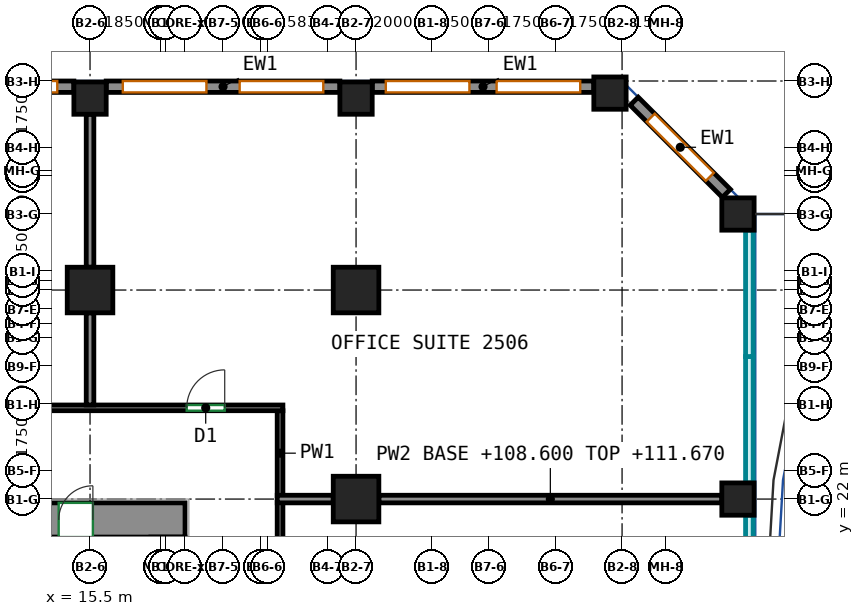
"""IFC4 building model, lengths in metres.
Left out: names, types, materials, properties, quantities, classifications, styles, units other than length and angle.
Written with IfcOpenShell. Run it as: python <this file> out.ifc"""

import sys

from ifc_helpers import new_model, si_unit, direction, frame, frame_2d, origin, origin_2d, place, context, subcontext, project, spatial, rectangle, extrude, source, transform, mapped, element, fill, save


model = new_model("IFC4")
c1 = context("Model", 3, precision=1e-05, world=origin(), true_north=direction((0.0, 1.0)))
c2 = subcontext(c1, "Body", "Model", "MODEL_VIEW")
j1 = project(units=[si_unit("LENGTHUNIT", "METRE"), si_unit("PLANEANGLEUNIT", "RADIAN")], contexts=[c1])
p1 = place(None, origin())
s1 = spatial("IfcSite", under=j1, at=p1, CompositionType="ELEMENT")
p2 = place(p1, origin())
s2 = spatial("IfcBuilding", under=s1, at=p2, CompositionType="ELEMENT")
p3 = place(p2, frame((0.0, 0.0, 108.6)))
s3 = spatial("IfcBuildingStorey", under=s2, at=p3, CompositionType="ELEMENT", Elevation=108.6)
m1 = source(origin(), c2, "Body", "SweptSolid", [
    extrude(rectangle(XDim=1.2, YDim=1.2, at=origin_2d()), origin(), (0.0, 0.0, 1.0), 3.72),
])
p4 = place(p3, frame((15.5, 27.5, 0.0), z_axis=(0.0, 0.0, 1.0), x_axis=(1.0, 0.0, 0.0)))
e1 = element("IfcColumn", 1, at=p4, inside=s3, PredefinedType="COLUMN", context=c2, shape_type="MappedRepresentation", body=[
    mapped(m1, transform((0.0, 0.0, 0.0))),
])
m2 = source(origin(), c2, "Body", "SweptSolid", [
    extrude(rectangle(XDim=0.85, YDim=0.85, at=origin_2d()), origin(), (0.0, 0.0, 1.0), 3.72),
])
p5 = place(p3, frame((15.5, 32.55, 0.0), z_axis=(0.0, 0.0, 1.0), x_axis=(1.0, 0.0, 0.0)))
e2 = element("IfcColumn", 2, at=p5, inside=s3, PredefinedType="COLUMN", context=c2, shape_type="MappedRepresentation", body=[
    mapped(m2, transform((0.0, 0.0, 0.0))),
])
for number, where, z_axis, x_axis in (
    (3, (22.5, 22.0, 0.0), (0.0, 0.0, 1.0), (1.0, 0.0, 0.0)),
    (4, (22.5, 27.5, 0.0), (0.0, 0.0, 1.0), (1.0, 0.0, 0.0)),
):
    element("IfcColumn", number, at=place(p3, frame(where, z_axis=z_axis, x_axis=x_axis)), inside=s3, PredefinedType="COLUMN", context=c2, shape_type="MappedRepresentation", body=[
        mapped(m1, transform((0.0, 0.0, 0.0))),
    ])
for number, where, z_axis, x_axis in (
    (5, (22.5, 32.55, 0.0), (0.0, 0.0, 1.0), (1.0, 0.0, 0.0)),
    (6, (29.182, 32.682, 0.0), (0.0, 0.0, 1.0), (1.0, 0.0, 0.0)),
    (7, (32.55, 22.0, 0.0), (0.0, 0.0, 1.0), (1.0, 0.0, 0.0)),
    (8, (32.55, 29.5, 0.0), (0.0, 0.0, 1.0), (1.0, 0.0, 0.0)),
):
    element("IfcColumn", number, at=place(p3, frame(where, z_axis=z_axis, x_axis=x_axis)), inside=s3, PredefinedType="COLUMN", context=c2, shape_type="MappedRepresentation", body=[
        mapped(m2, transform((0.0, 0.0, 0.0))),
    ])
m3 = source(origin(), c2, "Body", "SweptSolid", [
    extrude(rectangle(XDim=33.9, YDim=0.9, at=frame_2d((16.95, 0.0))), origin(), (0.0, 0.0, 1.0), 3.72),
])
p6 = place(p3, frame((-15.9, 21.45, 0.0), z_axis=(0.0, 0.0, 1.0), x_axis=(1.0, 0.0, 0.0)))
e9 = element("IfcWall", 9, at=p6, inside=s3, PredefinedType="SHEAR", context=c2, shape_type="MappedRepresentation", body=[
    mapped(m3, transform((0.0, 0.0, 0.0))),
])
p7 = place(p6, frame((7.12, 0.0, 0.0)))
e10 = element("IfcOpeningElement", 10, at=p7, cuts=e9, PredefinedType="OPENING", context=c2, shape_type="SweptSolid", body=[
    extrude(rectangle(XDim=0.9, YDim=2.1, at=frame_2d((0.45, 1.05))), frame((0.0, 0.46, 0.0), z_axis=(0.0, -1.0, 0.0), x_axis=(1.0, 0.0, 0.0)), (0.0, 0.0, 1.0), 0.92),
])
p8 = place(p6, frame((12.427, 0.0, 0.0)))
e11 = element("IfcOpeningElement", 11, at=p8, cuts=e9, PredefinedType="OPENING", context=c2, shape_type="SweptSolid", body=[
    extrude(rectangle(XDim=0.9, YDim=2.1, at=frame_2d((0.45, 1.05))), frame((0.0, 0.46, 0.0), z_axis=(0.0, -1.0, 0.0), x_axis=(1.0, 0.0, 0.0)), (0.0, 0.0, 1.0), 0.92),
])
p9 = place(p6, frame((17.465, 0.0, 0.0)))
e12 = element("IfcOpeningElement", 12, at=p9, cuts=e9, PredefinedType="OPENING", context=c2, shape_type="SweptSolid", body=[
    extrude(rectangle(XDim=0.9, YDim=2.1, at=frame_2d((0.45, 1.05))), frame((0.0, 0.46, 0.0), z_axis=(0.0, -1.0, 0.0), x_axis=(1.0, 0.0, 0.0)), (0.0, 0.0, 1.0), 0.92),
])
p10 = place(p6, frame((21.686, 0.0, 0.0)))
e13 = element("IfcOpeningElement", 13, at=p10, cuts=e9, PredefinedType="OPENING", context=c2, shape_type="SweptSolid", body=[
    extrude(rectangle(XDim=0.9, YDim=2.1, at=frame_2d((0.45, 1.05))), frame((0.0, 0.46, 0.0), z_axis=(0.0, -1.0, 0.0), x_axis=(1.0, 0.0, 0.0)), (0.0, 0.0, 1.0), 0.92),
])
p11 = place(p6, frame((26.027, 0.0, 0.0)))
e14 = element("IfcOpeningElement", 14, at=p11, cuts=e9, PredefinedType="OPENING", context=c2, shape_type="SweptSolid", body=[
    extrude(rectangle(XDim=0.9, YDim=2.1, at=frame_2d((0.45, 1.05))), frame((0.0, 0.46, 0.0), z_axis=(0.0, -1.0, 0.0), x_axis=(1.0, 0.0, 0.0)), (0.0, 0.0, 1.0), 0.92),
])
p12 = place(p6, frame((2.425, 0.0, 0.0)))
e15 = element("IfcOpeningElement", 15, at=p12, cuts=e9, PredefinedType="OPENING", context=c2, shape_type="SweptSolid", body=[
    extrude(rectangle(XDim=0.9, YDim=2.1, at=frame_2d((0.45, 1.05))), frame((0.0, 0.46, 0.0), z_axis=(0.0, -1.0, 0.0), x_axis=(1.0, 0.0, 0.0)), (0.0, 0.0, 1.0), 0.92),
])
p13 = place(p6, frame((30.575, 0.0, 0.0)))
e16 = element("IfcOpeningElement", 16, at=p13, cuts=e9, PredefinedType="OPENING", context=c2, shape_type="SweptSolid", body=[
    extrude(rectangle(XDim=0.9, YDim=2.1, at=frame_2d((0.45, 1.05))), frame((0.0, 0.46, 0.0), z_axis=(0.0, -1.0, 0.0), x_axis=(1.0, 0.0, 0.0)), (0.0, 0.0, 1.0), 0.92),
])
m4 = source(origin(), c2, "Body", "SweptSolid", [
    extrude(rectangle(XDim=3.429, YDim=0.3, at=frame_2d((1.715, 0.0))), origin(), (0.0, 0.0, 1.0), 3.72),
])
p14 = place(p3, frame((32.244, 30.044, 0.0), z_axis=(0.0, 0.0, 1.0), x_axis=(-0.707106781187, 0.707106781187, 0.0)))
e17 = element("IfcWall", 17, at=p14, inside=s3, PredefinedType="SOLIDWALL", context=c2, shape_type="MappedRepresentation", body=[
    mapped(m4, transform((0.0, 0.0, 0.0))),
])
p15 = place(p14, frame((0.615, 0.0, 0.7)))
e18 = element("IfcOpeningElement", 18, at=p15, cuts=e17, PredefinedType="OPENING", context=c2, shape_type="SweptSolid", body=[
    extrude(rectangle(XDim=2.2, YDim=2.25, at=frame_2d((1.1, 1.125))), frame((0.0, 0.16, 0.0), z_axis=(0.0, -1.0, 0.0), x_axis=(1.0, 0.0, 0.0)), (0.0, 0.0, 1.0), 0.32),
])
m5 = source(origin(), c2, "Body", "SweptSolid", [
    extrude(rectangle(XDim=5.832, YDim=0.3, at=frame_2d((2.916, 0.0))), origin(), (0.0, 0.0, 1.0), 3.72),
])
p16 = place(p3, frame((28.757, 32.85, 0.0), z_axis=(0.0, 0.0, 1.0), x_axis=(-1.0, 0.0, 0.0)))
e19 = element("IfcWall", 19, at=p16, inside=s3, PredefinedType="SOLIDWALL", context=c2, shape_type="MappedRepresentation", body=[
    mapped(m5, transform((0.0, 0.0, 0.0))),
])
p17 = place(p16, frame((0.358, 0.0, 0.7)))
e20 = element("IfcOpeningElement", 20, at=p17, cuts=e19, PredefinedType="OPENING", context=c2, shape_type="SweptSolid", body=[
    extrude(rectangle(XDim=2.2, YDim=2.25, at=frame_2d((1.1, 1.125))), frame((0.0, 0.16, 0.0), z_axis=(0.0, -1.0, 0.0), x_axis=(1.0, 0.0, 0.0)), (0.0, 0.0, 1.0), 0.32),
])
p18 = place(p16, frame((3.274, 0.0, 0.7)))
e21 = element("IfcOpeningElement", 21, at=p18, cuts=e19, PredefinedType="OPENING", context=c2, shape_type="SweptSolid", body=[
    extrude(rectangle(XDim=2.2, YDim=2.25, at=frame_2d((1.1, 1.125))), frame((0.0, 0.16, 0.0), z_axis=(0.0, -1.0, 0.0), x_axis=(1.0, 0.0, 0.0)), (0.0, 0.0, 1.0), 0.32),
])
m6 = source(origin(), c2, "Body", "SweptSolid", [
    extrude(rectangle(XDim=6.15, YDim=0.3, at=frame_2d((3.075, 0.0))), origin(), (0.0, 0.0, 1.0), 3.72),
])
p19 = place(p3, frame((22.075, 32.85, 0.0), z_axis=(0.0, 0.0, 1.0), x_axis=(-1.0, 0.0, 0.0)))
e22 = element("IfcWall", 22, at=p19, inside=s3, PredefinedType="SOLIDWALL", context=c2, shape_type="MappedRepresentation", body=[
    mapped(m6, transform((0.0, 0.0, 0.0))),
])
p20 = place(p19, frame((0.438, 0.0, 0.7)))
e23 = element("IfcOpeningElement", 23, at=p20, cuts=e22, PredefinedType="OPENING", context=c2, shape_type="SweptSolid", body=[
    extrude(rectangle(XDim=2.2, YDim=2.25, at=frame_2d((1.1, 1.125))), frame((0.0, 0.16, 0.0), z_axis=(0.0, -1.0, 0.0), x_axis=(1.0, 0.0, 0.0)), (0.0, 0.0, 1.0), 0.32),
])
p21 = place(p19, frame((3.512, 0.0, 0.7)))
e24 = element("IfcOpeningElement", 24, at=p21, cuts=e22, PredefinedType="OPENING", context=c2, shape_type="SweptSolid", body=[
    extrude(rectangle(XDim=2.2, YDim=2.25, at=frame_2d((1.1, 1.125))), frame((0.0, 0.16, 0.0), z_axis=(0.0, -1.0, 0.0), x_axis=(1.0, 0.0, 0.0)), (0.0, 0.0, 1.0), 0.32),
])
p22 = place(p3, frame((15.075, 32.85, 0.0), z_axis=(0.0, 0.0, 1.0), x_axis=(-1.0, 0.0, 0.0)))
e25 = element("IfcWall", 25, at=p22, inside=s3, PredefinedType="SOLIDWALL", context=c2, shape_type="MappedRepresentation", body=[
    mapped(m6, transform((0.0, 0.0, 0.0))),
])
p23 = place(p22, frame((0.438, 0.0, 0.7)))
e26 = element("IfcOpeningElement", 26, at=p23, cuts=e25, PredefinedType="OPENING", context=c2, shape_type="SweptSolid", body=[
    extrude(rectangle(XDim=2.2, YDim=2.25, at=frame_2d((1.1, 1.125))), frame((0.0, 0.16, 0.0), z_axis=(0.0, -1.0, 0.0), x_axis=(1.0, 0.0, 0.0)), (0.0, 0.0, 1.0), 0.32),
])
p24 = place(p22, frame((3.512, 0.0, 0.7)))
e27 = element("IfcOpeningElement", 27, at=p24, cuts=e25, PredefinedType="OPENING", context=c2, shape_type="SweptSolid", body=[
    extrude(rectangle(XDim=2.2, YDim=2.25, at=frame_2d((1.1, 1.125))), frame((0.0, 0.16, 0.0), z_axis=(0.0, -1.0, 0.0), x_axis=(1.0, 0.0, 0.0)), (0.0, 0.0, 1.0), 0.32),
])
p25 = place(p3, frame((20.5, 17.75, 0.0), z_axis=(0.0, 0.0, 1.0), x_axis=(0.0, 1.0, 0.0)))
e28 = element("IfcWall", 28, at=p25, inside=s3, PredefinedType="PARTITIONING", context=c2, shape_type="SweptSolid", body=[
    extrude(rectangle(XDim=4.16, YDim=0.15, at=frame_2d((2.08, 0.0))), origin(), (0.0, 0.0, 1.0), 3.72),
])
p26 = place(p25, frame((1.324, 0.0, 0.0)))
e29 = element("IfcOpeningElement", 29, at=p26, cuts=e28, PredefinedType="OPENING", context=c2, shape_type="SweptSolid", body=[
    extrude(rectangle(XDim=0.9, YDim=2.1, at=frame_2d((0.45, 1.05))), frame((0.0, 0.085, 0.0), z_axis=(0.0, -1.0, 0.0), x_axis=(1.0, 0.0, 0.0)), (0.0, 0.0, 1.0), 0.17),
])
p27 = place(p3, frame((20.5, 22.09, 0.0), z_axis=(0.0, 0.0, 1.0), x_axis=(0.0, 1.0, 0.0)))
e30 = element("IfcWall", 30, at=p27, inside=s3, PredefinedType="PARTITIONING", context=c2, shape_type="SweptSolid", body=[
    extrude(rectangle(XDim=2.235, YDim=0.15, at=frame_2d((1.117, 0.0))), origin(), (0.0, 0.0, 1.0), 3.72),
])
p28 = place(p3, frame((-19.575, 24.4, 0.0), z_axis=(0.0, 0.0, 1.0), x_axis=(1.0, 0.0, 0.0)))
e31 = element("IfcWall", 31, at=p28, inside=s3, PredefinedType="PARTITIONING", context=c2, shape_type="SweptSolid", body=[
    extrude(rectangle(XDim=40.15, YDim=0.15, at=frame_2d((20.075, 0.0))), origin(), (0.0, 0.0, 1.0), 3.72),
])
p29 = place(p28, frame((9.974, 0.0, 0.0)))
e32 = element("IfcOpeningElement", 32, at=p29, cuts=e31, PredefinedType="OPENING", context=c2, shape_type="SweptSolid", body=[
    extrude(rectangle(XDim=0.9, YDim=2.1, at=frame_2d((0.45, 1.05))), frame((0.0, 0.085, 0.0), z_axis=(0.0, -1.0, 0.0), x_axis=(1.0, 0.0, 0.0)), (0.0, 0.0, 1.0), 0.17),
])
p30 = place(p28, frame((15.57, 0.0, 0.0)))
e33 = element("IfcOpeningElement", 33, at=p30, cuts=e31, PredefinedType="OPENING", context=c2, shape_type="SweptSolid", body=[
    extrude(rectangle(XDim=0.9, YDim=2.1, at=frame_2d((0.45, 1.05))), frame((0.0, 0.085, 0.0), z_axis=(0.0, -1.0, 0.0), x_axis=(1.0, 0.0, 0.0)), (0.0, 0.0, 1.0), 0.17),
])
p31 = place(p28, frame((26.373, 0.0, 0.0)))
e34 = element("IfcOpeningElement", 34, at=p31, cuts=e31, PredefinedType="OPENING", context=c2, shape_type="SweptSolid", body=[
    extrude(rectangle(XDim=1.0, YDim=2.1, at=frame_2d((0.5, 1.05))), frame((0.0, 0.085, 0.0), z_axis=(0.0, -1.0, 0.0), x_axis=(1.0, 0.0, 0.0)), (0.0, 0.0, 1.0), 0.17),
])
p32 = place(p28, frame((37.619, 0.0, 0.0)))
e35 = element("IfcOpeningElement", 35, at=p32, cuts=e31, PredefinedType="OPENING", context=c2, shape_type="SweptSolid", body=[
    extrude(rectangle(XDim=1.0, YDim=2.1, at=frame_2d((0.5, 1.05))), frame((0.0, 0.085, 0.0), z_axis=(0.0, -1.0, 0.0), x_axis=(1.0, 0.0, 0.0)), (0.0, 0.0, 1.0), 0.17),
])
p33 = place(p3, frame((23.1, 22.0, 0.0), z_axis=(0.0, 0.0, 1.0), x_axis=(1.0, 0.0, 0.0)))
e36 = element("IfcWall", 36, at=p33, inside=s3, PredefinedType="PARTITIONING", context=c2, shape_type="SweptSolid", body=[
    extrude(rectangle(XDim=9.025, YDim=0.2, at=frame_2d((4.512, 0.0))), origin(), (0.0, 0.0, 1.0), 3.07),
])
p34 = place(p3, frame((20.426, 22.0, 0.0), z_axis=(0.0, 0.0, 1.0), x_axis=(1.0, 0.0, 0.0)))
e37 = element("IfcWall", 37, at=p34, inside=s3, PredefinedType="PARTITIONING", context=c2, shape_type="SweptSolid", body=[
    extrude(rectangle(XDim=1.474, YDim=0.2, at=frame_2d((0.737, 0.0))), origin(), (0.0, 0.0, 1.0), 3.72),
])
p35 = place(p3, frame((15.5, 28.1, 0.0), z_axis=(0.0, 0.0, 1.0), x_axis=(0.0, 1.0, 0.0)))
e38 = element("IfcWall", 38, at=p35, inside=s3, PredefinedType="PARTITIONING", context=c2, shape_type="SweptSolid", body=[
    extrude(rectangle(XDim=4.025, YDim=0.2, at=frame_2d((2.012, 0.0))), origin(), (0.0, 0.0, 1.0), 3.72),
])
p36 = place(p3, frame((15.5, 24.476, 0.0), z_axis=(0.0, 0.0, 1.0), x_axis=(0.0, 1.0, 0.0)))
e39 = element("IfcWall", 39, at=p36, inside=s3, PredefinedType="PARTITIONING", context=c2, shape_type="SweptSolid", body=[
    extrude(rectangle(XDim=2.424, YDim=0.2, at=frame_2d((1.212, 0.0))), origin(), (0.0, 0.0, 1.0), 3.72),
])
p37 = place(p15, origin())
e40 = element("IfcWindow", 40, at=p37, inside=s3, PartitioningType="SINGLE_PANEL", PredefinedType="WINDOW", context=c2, shape_type="SweptSolid", body=[
    extrude(rectangle(XDim=2.2, YDim=2.25, at=frame_2d((1.1, 1.125))), frame((0.0, 0.03, 0.0), z_axis=(0.0, -1.0, 0.0), x_axis=(1.0, 0.0, 0.0)), (0.0, 0.0, 1.0), 0.06),
])
fill(e18, e40)
p38 = place(p17, origin())
e41 = element("IfcWindow", 41, at=p38, inside=s3, PartitioningType="SINGLE_PANEL", PredefinedType="WINDOW", context=c2, shape_type="SweptSolid", body=[
    extrude(rectangle(XDim=2.2, YDim=2.25, at=frame_2d((1.1, 1.125))), frame((0.0, 0.03, 0.0), z_axis=(0.0, -1.0, 0.0), x_axis=(1.0, 0.0, 0.0)), (0.0, 0.0, 1.0), 0.06),
])
fill(e20, e41)
p39 = place(p18, origin())
e42 = element("IfcWindow", 42, at=p39, inside=s3, PartitioningType="SINGLE_PANEL", PredefinedType="WINDOW", context=c2, shape_type="SweptSolid", body=[
    extrude(rectangle(XDim=2.2, YDim=2.25, at=frame_2d((1.1, 1.125))), frame((0.0, 0.03, 0.0), z_axis=(0.0, -1.0, 0.0), x_axis=(1.0, 0.0, 0.0)), (0.0, 0.0, 1.0), 0.06),
])
fill(e21, e42)
p40 = place(p20, origin())
e43 = element("IfcWindow", 43, at=p40, inside=s3, PartitioningType="SINGLE_PANEL", PredefinedType="WINDOW", context=c2, shape_type="SweptSolid", body=[
    extrude(rectangle(XDim=2.2, YDim=2.25, at=frame_2d((1.1, 1.125))), frame((0.0, 0.03, 0.0), z_axis=(0.0, -1.0, 0.0), x_axis=(1.0, 0.0, 0.0)), (0.0, 0.0, 1.0), 0.06),
])
fill(e23, e43)
p41 = place(p21, origin())
e44 = element("IfcWindow", 44, at=p41, inside=s3, PartitioningType="SINGLE_PANEL", PredefinedType="WINDOW", context=c2, shape_type="SweptSolid", body=[
    extrude(rectangle(XDim=2.2, YDim=2.25, at=frame_2d((1.1, 1.125))), frame((0.0, 0.03, 0.0), z_axis=(0.0, -1.0, 0.0), x_axis=(1.0, 0.0, 0.0)), (0.0, 0.0, 1.0), 0.06),
])
fill(e24, e44)
p42 = place(p23, origin())
e45 = element("IfcWindow", 45, at=p42, inside=s3, PartitioningType="SINGLE_PANEL", PredefinedType="WINDOW", context=c2, shape_type="SweptSolid", body=[
    extrude(rectangle(XDim=2.2, YDim=2.25, at=frame_2d((1.1, 1.125))), frame((0.0, 0.03, 0.0), z_axis=(0.0, -1.0, 0.0), x_axis=(1.0, 0.0, 0.0)), (0.0, 0.0, 1.0), 0.06),
])
fill(e26, e45)
p43 = place(p13, origin())
e46 = element("IfcDoor", 46, at=p43, inside=s3, OperationType="SINGLE_SWING_RIGHT", PredefinedType="DOOR", context=c2, shape_type="SweptSolid", body=[
    extrude(rectangle(XDim=0.9, YDim=2.1, at=frame_2d((0.45, 1.05))), frame((0.0, -0.305, 0.0), z_axis=(0.0, -1.0, 0.0), x_axis=(1.0, 0.0, 0.0)), (0.0, 0.0, 1.0), 0.05),
])
fill(e16, e46)
p44 = place(p32, origin())
e47 = element("IfcDoor", 47, at=p44, inside=s3, OperationType="SINGLE_SWING_RIGHT", PredefinedType="DOOR", context=c2, shape_type="SweptSolid", body=[
    extrude(rectangle(XDim=1.0, YDim=2.1, at=frame_2d((0.5, 1.05))), frame((0.0, 0.025, 0.0), z_axis=(0.0, -1.0, 0.0), x_axis=(1.0, 0.0, 0.0)), (0.0, 0.0, 1.0), 0.05),
])
fill(e35, e47)
save(model, sys.argv[1])
